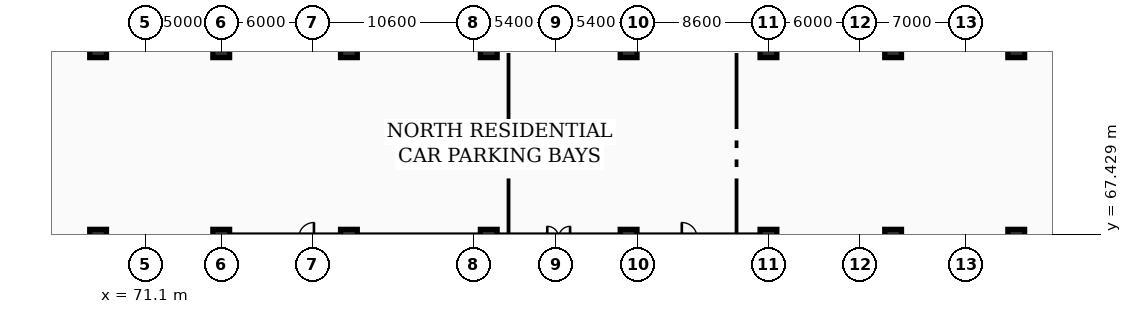
"""IFC4 building model, lengths in metres.
Left out: names, types, materials, properties, quantities, classifications, styles, units other than length and angle.
Written with IfcOpenShell. Run it as: python <this file> out.ifc"""

import sys

from ifc_helpers import new_model, si_unit, direction, frame, origin, origin_2d, place, context, subcontext, project, spatial, rectangle, extrude, element, save


model = new_model("IFC4")
c1 = context("Model", 3, precision=1e-05, world=origin(), true_north=direction((0.0, 1.0)))
c2 = subcontext(c1, "Body", "Model", "MODEL_VIEW")
j1 = project(units=[si_unit("LENGTHUNIT", "METRE"), si_unit("PLANEANGLEUNIT", "RADIAN")], contexts=[c1])
p1 = place(None, origin())
s1 = spatial("IfcSite", under=j1, at=p1, CompositionType="ELEMENT")
p2 = place(p1, origin())
s2 = spatial("IfcBuilding", under=s1, at=p2, CompositionType="ELEMENT")
p3 = place(p2, frame((0.0, 0.0, -3.6)))
s3 = spatial("IfcBuildingStorey", under=s2, at=p3, CompositionType="ELEMENT", Elevation=-3.6)
for number, where, z_axis, x_axis in (
    (1, (68.0, 67.2, 0.0), (0.0, 0.0, 1.0), (1.0, 0.0, 0.0)),
    (2, (68.0, 79.6, 0.0), (0.0, 0.0, 1.0), (1.0, 0.0, 0.0)),
    (3, (76.1, 67.2, 0.0), (0.0, 0.0, 1.0), (1.0, 0.0, 0.0)),
    (4, (76.1, 79.6, 0.0), (0.0, 0.0, 1.0), (1.0, 0.0, 0.0)),
    (5, (84.5, 67.2, 0.0), (0.0, 0.0, 1.0), (1.0, 0.0, 0.0)),
    (6, (84.5, 79.6, 0.0), (0.0, 0.0, 1.0), (1.0, 0.0, 0.0)),
    (7, (93.7, 67.2, 0.0), (0.0, 0.0, 1.0), (1.0, 0.0, 0.0)),
    (8, (93.7, 79.6, 0.0), (0.0, 0.0, 1.0), (1.0, 0.0, 0.0)),
    (9, (102.9, 67.2, 0.0), (0.0, 0.0, 1.0), (1.0, 0.0, 0.0)),
    (10, (102.9, 79.6, 0.0), (0.0, 0.0, 1.0), (1.0, 0.0, 0.0)),
    (11, (112.1, 67.2, 0.0), (0.0, 0.0, 1.0), (1.0, 0.0, 0.0)),
    (12, (112.1, 79.6, 0.0), (0.0, 0.0, 1.0), (1.0, 0.0, 0.0)),
    (13, (120.3, 67.2, 0.0), (0.0, 0.0, 1.0), (1.0, 0.0, 0.0)),
    (14, (120.3, 79.6, 0.0), (0.0, 0.0, 1.0), (1.0, 0.0, 0.0)),
    (15, (128.4, 67.2, 0.0), (0.0, 0.0, 1.0), (1.0, 0.0, 0.0)),
    (16, (128.4, 79.6, 0.0), (0.0, 0.0, 1.0), (1.0, 0.0, 0.0)),
):
    element("IfcColumn", number, at=place(p3, frame(where, z_axis=z_axis, x_axis=x_axis)), inside=s3, PredefinedType="COLUMN", context=c2, shape_type="SweptSolid", body=[
        extrude(rectangle(XDim=1.1, YDim=1.1, at=origin_2d()), origin(), (0.0, 0.0, 1.0), 3.6),
    ])
save(model, sys.argv[1])
